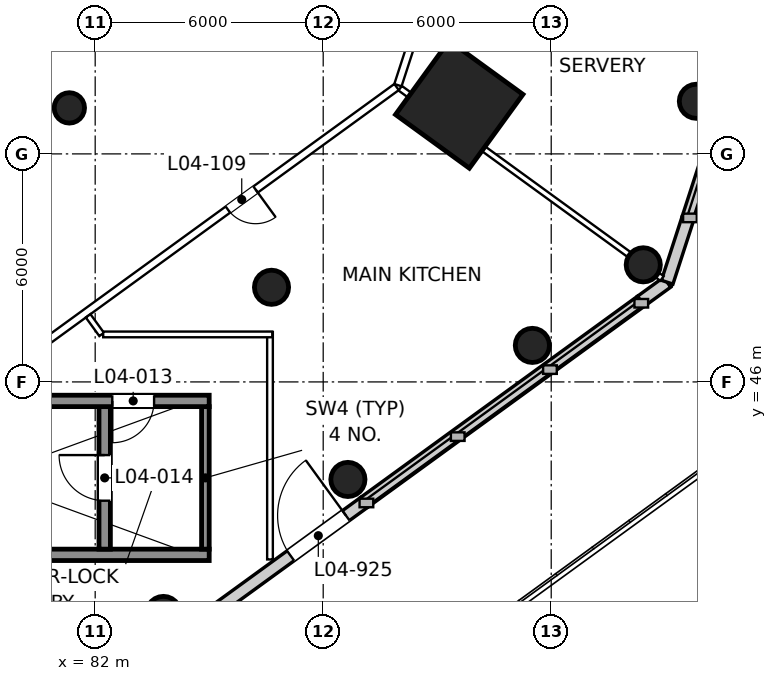
"""IFC4 building model, lengths in metres.
Left out: names, types, materials, properties, quantities, classifications, styles, units other than length and angle.
Written with IfcOpenShell. Run it as: python <this file> out.ifc"""

import sys

from ifc_helpers import new_model, si_unit, direction, frame, frame_2d, origin, origin_2d, place, context, subcontext, project, spatial, rectangle, circle, extrude, element, fill, save


model = new_model("IFC4")
c1 = context("Model", 3, precision=1e-05, world=origin(), true_north=direction((0.0, 1.0)))
c2 = subcontext(c1, "Body", "Model", "MODEL_VIEW")
j1 = project(units=[si_unit("LENGTHUNIT", "METRE"), si_unit("PLANEANGLEUNIT", "RADIAN")], contexts=[c1])
p1 = place(None, origin())
s1 = spatial("IfcSite", under=j1, at=p1, CompositionType="ELEMENT")
p2 = place(p1, origin())
s2 = spatial("IfcBuilding", under=s1, at=p2, CompositionType="ELEMENT")
p3 = place(p2, frame((0.0, 0.0, 29.0)))
s3 = spatial("IfcBuildingStorey", under=s2, at=p3, CompositionType="ELEMENT", Elevation=29.0)
p4 = place(p3, frame((86.64, 48.49, 0.0), z_axis=(0.0, 0.0, 1.0), x_axis=(1.0, 0.0, 0.0)))
e1 = element("IfcColumn", 1, at=p4, inside=s3, PredefinedType="COLUMN", context=c2, shape_type="SweptSolid", body=[
    extrude(circle(Radius=0.45, at=origin_2d()), origin(), (0.0, 0.0, 1.0), 5.0),
])
p5 = place(p3, frame((91.58, 53.3, 0.0), z_axis=(0.0, 0.0, 1.0), x_axis=(0.809016994375, -0.587785252292, 0.0)))
e2 = element("IfcColumn", 2, at=p5, inside=s3, PredefinedType="COLUMN", context=c2, shape_type="SweptSolid", body=[
    extrude(rectangle(XDim=2.4, YDim=2.4, at=origin_2d()), origin(), (0.0, 0.0, 1.0), 5.0),
])
p6 = place(p3, frame((81.32, 53.21, 0.0), z_axis=(0.0, 0.0, 1.0), x_axis=(1.0, 0.0, 0.0)))
e3 = element("IfcColumn", 3, at=p6, inside=s3, PredefinedType="COLUMN", context=c2, shape_type="SweptSolid", body=[
    extrude(circle(Radius=0.4, at=origin_2d()), origin(), (0.0, 0.0, 1.0), 5.0),
])
for number, where, z_axis, x_axis in (
    (4, (83.796, 39.908, 0.0), (0.0, 0.0, 1.0), (1.0, 0.0, 0.0)),
    (5, (88.65, 43.434, 0.0), (0.0, 0.0, 1.0), (1.0, 0.0, 0.0)),
    (6, (93.504, 46.961, 0.0), (0.0, 0.0, 1.0), (1.0, 0.0, 0.0)),
    (7, (96.422, 49.081, 0.0), (0.0, 0.0, 1.0), (1.0, 0.0, 0.0)),
    (8, (97.82, 53.384, 0.0), (0.0, 0.0, 1.0), (1.0, 0.0, 0.0)),
):
    element("IfcColumn", number, at=place(p3, frame(where, z_axis=z_axis, x_axis=x_axis)), inside=s3, PredefinedType="COLUMN", context=c2, shape_type="SweptSolid", body=[
        extrude(circle(Radius=0.45, at=origin_2d()), origin(), (0.0, 0.0, 1.0), 5.0),
    ])
p7 = place(p3, frame((81.804, 37.546, 0.0), z_axis=(0.0, 0.0, 1.0), x_axis=(0.809022210299, 0.587778073121, 0.0)))
e9 = element("IfcWall", 9, at=p7, inside=s3, PredefinedType="SOLIDWALL", context=c2, shape_type="SweptSolid", body=[
    extrude(rectangle(XDim=9.0, YDim=0.32, at=frame_2d((4.5, 0.0))), origin(), (0.0, 0.0, 1.0), 4.65),
])
p8 = place(p7, frame((6.6, 0.0, 0.0)))
e10 = element("IfcOpeningElement", 10, at=p8, cuts=e9, PredefinedType="OPENING", context=c2, shape_type="SweptSolid", body=[
    extrude(rectangle(XDim=1.8, YDim=2.4, at=frame_2d((0.9, 1.2))), frame((0.0, 0.17, 0.0), z_axis=(0.0, -1.0, 0.0), x_axis=(1.0, 0.0, 0.0)), (0.0, 0.0, 1.0), 0.34),
])
p9 = place(p3, frame((89.085, 42.836, 0.0), z_axis=(0.0, 0.0, 1.0), x_axis=(0.808999938455, 0.587808727036, 0.0)))
e11 = element("IfcWall", 11, at=p9, inside=s3, PredefinedType="SOLIDWALL", context=c2, shape_type="SweptSolid", body=[
    extrude(rectangle(XDim=9.0, YDim=0.32, at=frame_2d((4.5, 0.0))), origin(), (0.0, 0.0, 1.0), 0.9),
])
p10 = place(p3, frame((96.366, 48.126, 0.0), z_axis=(0.0, 0.0, 1.0), x_axis=(0.809172006105, 0.587571837766, 0.0)))
e12 = element("IfcWall", 12, at=p10, inside=s3, PredefinedType="SOLIDWALL", context=c2, shape_type="SweptSolid", body=[
    extrude(rectangle(XDim=0.847, YDim=0.32, at=frame_2d((0.424, 0.0))), origin(), (0.0, 0.0, 1.0), 4.65),
])
p11 = place(p3, frame((97.052, 48.624, 0.0), z_axis=(0.0, 0.0, 1.0), x_axis=(0.308995332064, 0.951063554534, 0.0)))
e13 = element("IfcWall", 13, at=p11, inside=s3, PredefinedType="SOLIDWALL", context=c2, shape_type="SweptSolid", body=[
    extrude(rectangle(XDim=1.764, YDim=0.32, at=frame_2d((0.882, 0.0))), origin(), (0.0, 0.0, 1.0), 4.65),
])
p12 = place(p3, frame((97.597, 50.302, 0.0), z_axis=(0.0, 0.0, 1.0), x_axis=(0.309000197986, 0.951061973609, 0.0)))
e14 = element("IfcWall", 14, at=p12, inside=s3, PredefinedType="SOLIDWALL", context=c2, shape_type="SweptSolid", body=[
    extrude(rectangle(XDim=9.0, YDim=0.32, at=frame_2d((4.5, 0.0))), origin(), (0.0, 0.0, 1.0), 0.9),
])
p13 = place(p3, frame((73.1, 41.45, 0.0), z_axis=(0.0, 0.0, 1.0), x_axis=(1.0, 0.0, 0.0)))
e15 = element("IfcWall", 15, at=p13, inside=s3, PredefinedType="SHEAR", context=c2, shape_type="SweptSolid", body=[
    extrude(rectangle(XDim=11.9, YDim=0.3, at=frame_2d((5.95, 0.0))), origin(), (0.0, 0.0, 1.0), 5.0),
])
p14 = place(p3, frame((82.25, 41.6, 0.0), z_axis=(0.0, 0.0, 1.0), x_axis=(0.0, 1.0, 0.0)))
e16 = element("IfcWall", 16, at=p14, inside=s3, PredefinedType="SHEAR", context=c2, shape_type="SweptSolid", body=[
    extrude(rectangle(XDim=3.75, YDim=0.3, at=frame_2d((1.875, 0.0))), origin(), (0.0, 0.0, 1.0), 5.0),
])
p15 = place(p14, frame((1.275, 0.0, 0.0)))
e17 = element("IfcOpeningElement", 17, at=p15, cuts=e16, PredefinedType="OPENING", context=c2, shape_type="SweptSolid", body=[
    extrude(rectangle(XDim=1.2, YDim=2.1, at=frame_2d((0.6, 1.05))), frame((0.0, 0.16, 0.0), z_axis=(0.0, -1.0, 0.0), x_axis=(1.0, 0.0, 0.0)), (0.0, 0.0, 1.0), 0.32),
])
p16 = place(p3, frame((84.9, 41.6, 0.0), z_axis=(0.0, 0.0, 1.0), x_axis=(0.0, 1.0, 0.0)))
e18 = element("IfcWall", 18, at=p16, inside=s3, PredefinedType="SHEAR", context=c2, shape_type="SweptSolid", body=[
    extrude(rectangle(XDim=3.75, YDim=0.2, at=frame_2d((1.875, 0.0))), origin(), (0.0, 0.0, 1.0), 5.0),
])
p17 = place(p3, frame((73.1, 45.5, 0.0), z_axis=(0.0, 0.0, 1.0), x_axis=(1.0, 0.0, 0.0)))
e19 = element("IfcWall", 19, at=p17, inside=s3, PredefinedType="SHEAR", context=c2, shape_type="SweptSolid", body=[
    extrude(rectangle(XDim=11.9, YDim=0.3, at=frame_2d((5.95, 0.0))), origin(), (0.0, 0.0, 1.0), 5.0),
])
p18 = place(p17, frame((9.35, 0.0, 0.0)))
e20 = element("IfcOpeningElement", 20, at=p18, cuts=e19, PredefinedType="OPENING", context=c2, shape_type="SweptSolid", body=[
    extrude(rectangle(XDim=1.1, YDim=2.1, at=frame_2d((0.55, 1.05))), frame((0.0, 0.16, 0.0), z_axis=(0.0, -1.0, 0.0), x_axis=(1.0, 0.0, 0.0)), (0.0, 0.0, 1.0), 0.32),
])
p19 = place(p3, frame((92.144, 60.508, 0.0), z_axis=(0.0, 0.0, 1.0), x_axis=(-0.309023375149, -0.951054443032, 0.0)))
e21 = element("IfcWall", 21, at=p19, inside=s3, PredefinedType="PARTITIONING", context=c2, shape_type="SweptSolid", body=[
    extrude(rectangle(XDim=7.044, YDim=0.2, at=frame_2d((3.522, 0.0))), origin(), (0.0, 0.0, 1.0), 4.65),
])
p20 = place(p19, frame((4.099, 0.0, 0.0)))
e22 = element("IfcOpeningElement", 22, at=p20, cuts=e21, PredefinedType="OPENING", context=c2, shape_type="SweptSolid", body=[
    extrude(rectangle(XDim=0.9, YDim=2.1, at=frame_2d((0.45, 1.05))), frame((0.0, 0.11, 0.0), z_axis=(0.0, -1.0, 0.0), x_axis=(1.0, 0.0, 0.0)), (0.0, 0.0, 1.0), 0.22),
])
p21 = place(p19, frame((0.545, 0.0, 0.0)))
e23 = element("IfcOpeningElement", 23, at=p21, cuts=e21, PredefinedType="OPENING", context=c2, shape_type="SweptSolid", body=[
    extrude(rectangle(XDim=0.9, YDim=2.1, at=frame_2d((0.45, 1.05))), frame((0.0, 0.11, 0.0), z_axis=(0.0, -1.0, 0.0), x_axis=(1.0, 0.0, 0.0)), (0.0, 0.0, 1.0), 0.22),
])
p22 = place(p3, frame((89.931, 53.759, 0.0), z_axis=(0.0, 0.0, 1.0), x_axis=(-0.809024401628, -0.587775056948, 0.0)))
e24 = element("IfcWall", 24, at=p22, inside=s3, PredefinedType="PARTITIONING", context=c2, shape_type="SweptSolid", body=[
    extrude(rectangle(XDim=13.763, YDim=0.2, at=frame_2d((6.882, 0.0))), origin(), (0.0, 0.0, 1.0), 4.65),
])
p23 = place(p22, frame((4.586, 0.0, 0.0)))
e25 = element("IfcOpeningElement", 25, at=p23, cuts=e24, PredefinedType="OPENING", context=c2, shape_type="SweptSolid", body=[
    extrude(rectangle(XDim=0.9, YDim=2.1, at=frame_2d((0.45, 1.05))), frame((0.0, 0.11, 0.0), z_axis=(0.0, -1.0, 0.0), x_axis=(1.0, 0.0, 0.0)), (0.0, 0.0, 1.0), 0.22),
])
p24 = place(p3, frame((96.915, 48.723, 0.0), z_axis=(0.0, 0.0, 1.0), x_axis=(-0.809007500309, 0.587798319531, 0.0)))
e26 = element("IfcWall", 26, at=p24, inside=s3, PredefinedType="PARTITIONING", context=c2, shape_type="SweptSolid", body=[
    extrude(rectangle(XDim=8.516, YDim=0.15, at=frame_2d((4.258, 0.0))), origin(), (0.0, 0.0, 1.0), 4.65),
])
p25 = place(p3, frame((82.17, 47.25, 0.0), z_axis=(0.0, 0.0, 1.0), x_axis=(-0.58790738915, 0.808928242666, 0.0)))
e27 = element("IfcWall", 27, at=p25, inside=s3, PredefinedType="PARTITIONING", context=c2, shape_type="SweptSolid", body=[
    extrude(rectangle(XDim=0.604, YDim=0.15, at=frame_2d((0.302, 0.0))), origin(), (0.0, 0.0, 1.0), 4.65),
])
p26 = place(p3, frame((86.6, 41.329, 0.0), z_axis=(0.0, 0.0, 1.0), x_axis=(0.0, 1.0, 0.0)))
e28 = element("IfcWall", 28, at=p26, inside=s3, PredefinedType="PARTITIONING", context=c2, shape_type="SweptSolid", body=[
    extrude(rectangle(XDim=5.981, YDim=0.15, at=frame_2d((2.991, 0.0))), origin(), (0.0, 0.0, 1.0), 3.95),
])
p27 = place(p3, frame((86.66, 47.25, 0.0), z_axis=(0.0, 0.0, 1.0), x_axis=(-1.0, 0.0, 0.0)))
e29 = element("IfcWall", 29, at=p27, inside=s3, PredefinedType="PARTITIONING", context=c2, shape_type="SweptSolid", body=[
    extrude(rectangle(XDim=4.449, YDim=0.15, at=frame_2d((2.225, 0.0))), origin(), (0.0, 0.0, 1.0), 3.95),
])
p28 = place(p8, origin())
e30 = element("IfcDoor", 30, at=p28, inside=s3, OperationType="DOUBLE_DOOR_DOUBLE_SWING", PredefinedType="DOOR", context=c2, shape_type="SweptSolid", body=[
    extrude(rectangle(XDim=1.8, YDim=2.4, at=frame_2d((0.9, 1.2))), frame((0.0, 0.04, 0.0), z_axis=(0.0, -1.0, 0.0), x_axis=(1.0, 0.0, 0.0)), (0.0, 0.0, 1.0), 0.05),
])
fill(e10, e30)
p29 = place(p18, frame((1.1, 0.0, 0.0), z_axis=(0.0, 0.0, 1.0), x_axis=(-1.0, 0.0, 0.0)))
e31 = element("IfcDoor", 31, at=p29, inside=s3, OperationType="SINGLE_SWING_RIGHT", PredefinedType="DOOR", context=c2, shape_type="SweptSolid", body=[
    extrude(rectangle(XDim=1.1, YDim=2.1, at=frame_2d((0.55, 1.05))), frame((0.0, 0.025, 0.0), z_axis=(0.0, -1.0, 0.0), x_axis=(1.0, 0.0, 0.0)), (0.0, 0.0, 1.0), 0.05),
])
fill(e20, e31)
p30 = place(p15, origin())
e32 = element("IfcDoor", 32, at=p30, inside=s3, OperationType="SINGLE_SWING_RIGHT", PredefinedType="DOOR", context=c2, shape_type="SweptSolid", body=[
    extrude(rectangle(XDim=1.2, YDim=2.1, at=frame_2d((0.6, 1.05))), frame((0.0, 0.025, 0.0), z_axis=(0.0, -1.0, 0.0), x_axis=(1.0, 0.0, 0.0)), (0.0, 0.0, 1.0), 0.05),
])
fill(e17, e32)
p31 = place(p23, origin())
e33 = element("IfcDoor", 33, at=p31, inside=s3, OperationType="SINGLE_SWING_LEFT", PredefinedType="DOOR", context=c2, shape_type="SweptSolid", body=[
    extrude(rectangle(XDim=0.9, YDim=2.1, at=frame_2d((0.45, 1.05))), frame((0.0, 0.025, 0.0), z_axis=(0.0, -1.0, 0.0), x_axis=(1.0, 0.0, 0.0)), (0.0, 0.0, 1.0), 0.05),
])
fill(e25, e33)
save(model, sys.argv[1])
